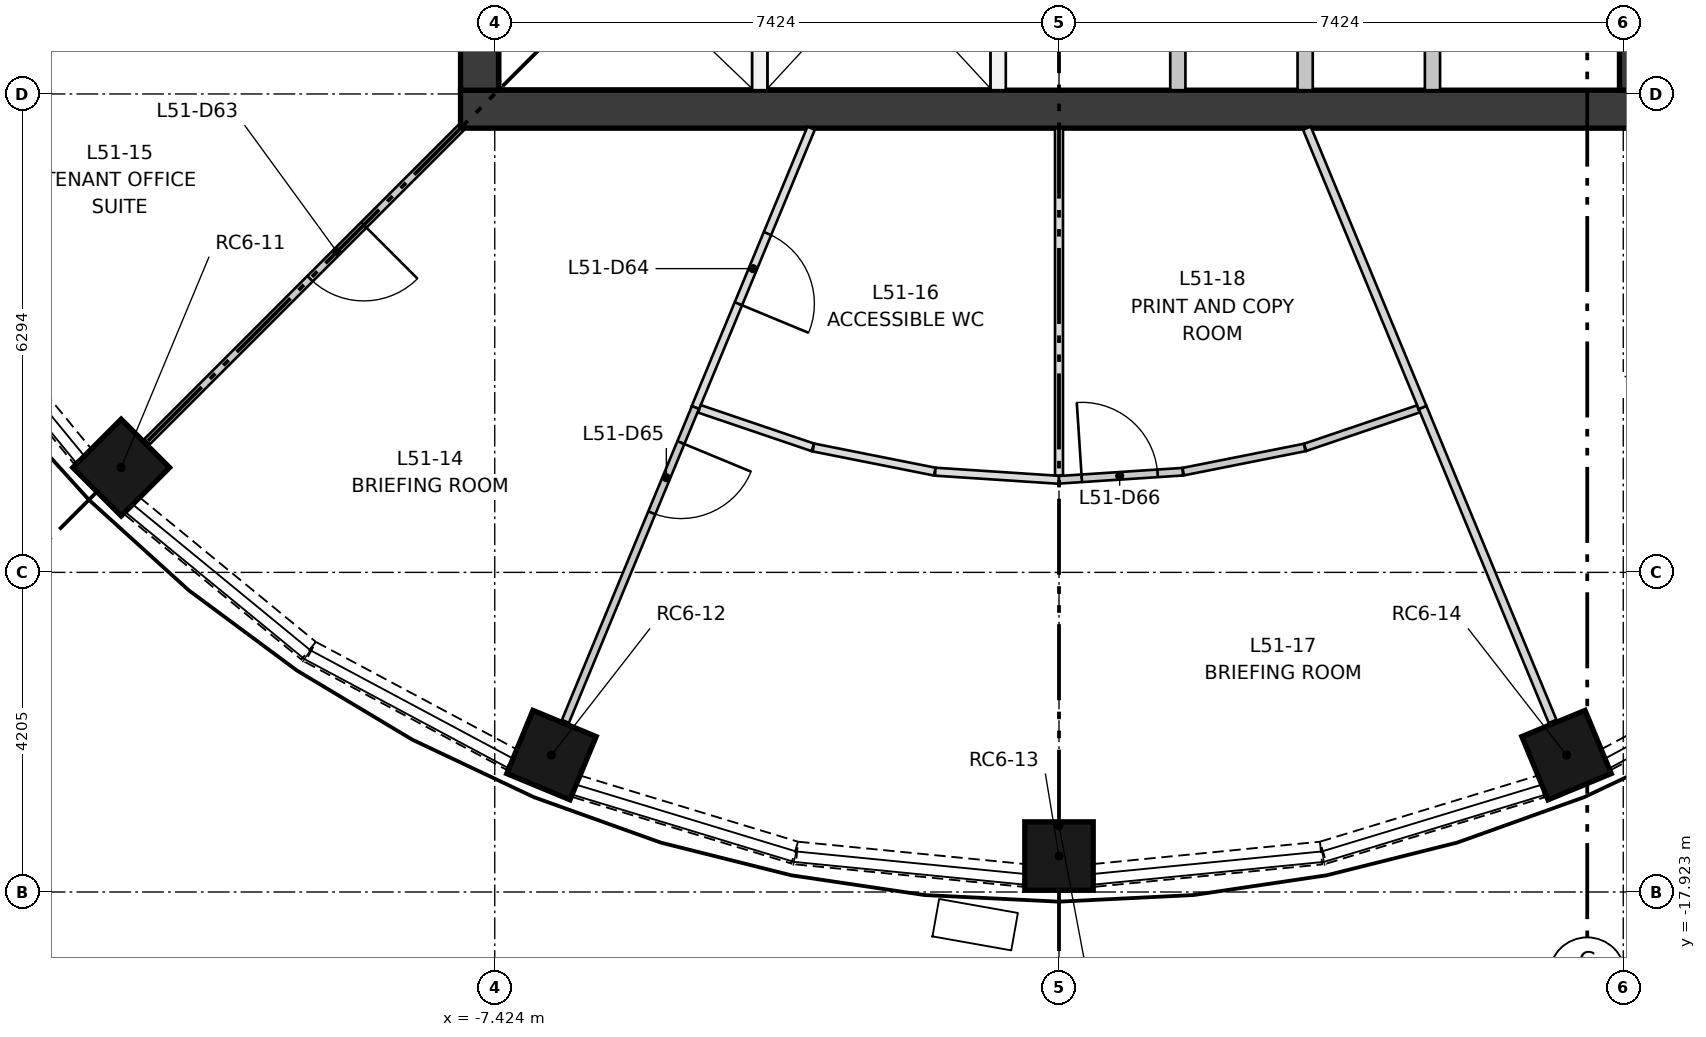
"""IFC4 building model, lengths in metres.
Left out: names, types, materials, properties, quantities, classifications, styles, units other than length and angle.
Written with IfcOpenShell. Run it as: python <this file> out.ifc"""

import sys

from ifc_helpers import new_model, si_unit, direction, frame, frame_2d, origin, origin_2d, place, context, subcontext, project, spatial, rectangle, extrude, element, fill, save


model = new_model("IFC4")
c1 = context("Model", 3, precision=1e-05, world=origin(), true_north=direction((0.0, 1.0)))
c2 = subcontext(c1, "Body", "Model", "MODEL_VIEW")
j1 = project(units=[si_unit("LENGTHUNIT", "METRE"), si_unit("PLANEANGLEUNIT", "RADIAN")], contexts=[c1])
p1 = place(None, origin())
s1 = spatial("IfcSite", under=j1, at=p1, CompositionType="ELEMENT")
p2 = place(p1, origin())
s2 = spatial("IfcBuilding", under=s1, at=p2, CompositionType="ELEMENT")
p3 = place(p2, frame((0.0, 0.0, 191.0)))
s3 = spatial("IfcBuildingStorey", under=s2, at=p3, CompositionType="ELEMENT", Elevation=191.0)
for number, where, z_axis, x_axis in (
    (1, (-12.339, -12.339, 0.0), (0.0, 0.0, 1.0), (-0.707, -0.707, 0.0)),
    (2, (-6.678, -16.122, 0.0), (0.0, 0.0, 1.0), (-0.383, -0.924, 0.0)),
    (3, (0.0, -17.45, 0.0), (0.0, 0.0, 1.0), (0.0, -1.0, 0.0)),
    (4, (6.678, -16.122, 0.0), (0.0, 0.0, 1.0), (0.383, -0.924, 0.0)),
):
    element("IfcColumn", number, at=place(p3, frame(where, z_axis=z_axis, x_axis=x_axis)), inside=s3, PredefinedType="COLUMN", context=c2, shape_type="SweptSolid", body=[
        extrude(rectangle(XDim=0.9, YDim=0.9, at=origin_2d()), origin(), (0.0, 0.0, 1.0), 2.85),
    ])
p4 = place(p3, frame((-7.874, -7.624, 0.0), z_axis=(0.0, 0.0, 1.0), x_axis=(1.0, 0.0, 0.0)))
e5 = element("IfcWall", 5, at=p4, inside=s3, PredefinedType="SHEAR", context=c2, shape_type="SweptSolid", body=[
    extrude(rectangle(XDim=15.748, YDim=0.5, at=frame_2d((7.874, 0.0))), origin(), (0.0, 0.0, 1.0), 3.35),
])
p5 = place(p3, frame((-7.624, -7.374, 0.0), z_axis=(0.0, 0.0, 1.0), x_axis=(0.0, 1.0, 0.0)))
e6 = element("IfcWall", 6, at=p5, inside=s3, PredefinedType="SHEAR", context=c2, shape_type="SweptSolid", body=[
    extrude(rectangle(XDim=14.748, YDim=0.5, at=frame_2d((7.374, 0.0))), origin(), (0.0, 0.0, 1.0), 3.35),
])
p6 = place(p5, frame((6.874, 0.0, 0.0)))
e7 = element("IfcOpeningElement", 7, at=p6, cuts=e6, PredefinedType="OPENING", context=c2, shape_type="SweptSolid", body=[
    extrude(rectangle(XDim=1.0, YDim=2.1, at=frame_2d((0.5, 1.05))), frame((0.0, 0.26, 0.0), z_axis=(0.0, -1.0, 0.0), x_axis=(1.0, 0.0, 0.0)), (0.0, 0.0, 1.0), 0.52),
])
p7 = place(p5, frame((3.75, 0.0, 0.0)))
e8 = element("IfcOpeningElement", 8, at=p7, cuts=e6, PredefinedType="OPENING", context=c2, shape_type="SweptSolid", body=[
    extrude(rectangle(XDim=1.8, YDim=2.1, at=frame_2d((0.9, 1.05))), frame((0.0, 0.26, 0.0), z_axis=(0.0, -1.0, 0.0), x_axis=(1.0, 0.0, 0.0)), (0.0, 0.0, 1.0), 0.52),
])
p8 = place(p5, frame((9.198, 0.0, 0.0)))
e9 = element("IfcOpeningElement", 9, at=p8, cuts=e6, PredefinedType="OPENING", context=c2, shape_type="SweptSolid", body=[
    extrude(rectangle(XDim=1.8, YDim=2.1, at=frame_2d((0.9, 1.05))), frame((0.0, 0.26, 0.0), z_axis=(0.0, -1.0, 0.0), x_axis=(1.0, 0.0, 0.0)), (0.0, 0.0, 1.0), 0.52),
])
p9 = place(p3, frame((7.624, -7.374, 0.0), z_axis=(0.0, 0.0, 1.0), x_axis=(0.0, 1.0, 0.0)))
e10 = element("IfcWall", 10, at=p9, inside=s3, PredefinedType="SHEAR", context=c2, shape_type="SweptSolid", body=[
    extrude(rectangle(XDim=14.748, YDim=0.5, at=frame_2d((7.374, 0.0))), origin(), (0.0, 0.0, 1.0), 3.35),
])
p10 = place(p9, frame((6.874, 0.0, 0.0)))
e11 = element("IfcOpeningElement", 11, at=p10, cuts=e10, PredefinedType="OPENING", context=c2, shape_type="SweptSolid", body=[
    extrude(rectangle(XDim=1.0, YDim=2.1, at=frame_2d((0.5, 1.05))), frame((0.0, 0.26, 0.0), z_axis=(0.0, -1.0, 0.0), x_axis=(1.0, 0.0, 0.0)), (0.0, 0.0, 1.0), 0.52),
])
p11 = place(p9, frame((3.75, 0.0, 0.0)))
e12 = element("IfcOpeningElement", 12, at=p11, cuts=e10, PredefinedType="OPENING", context=c2, shape_type="SweptSolid", body=[
    extrude(rectangle(XDim=1.8, YDim=2.1, at=frame_2d((0.9, 1.05))), frame((0.0, 0.26, 0.0), z_axis=(0.0, -1.0, 0.0), x_axis=(1.0, 0.0, 0.0)), (0.0, 0.0, 1.0), 0.52),
])
p12 = place(p9, frame((9.198, 0.0, 0.0)))
e13 = element("IfcOpeningElement", 13, at=p12, cuts=e10, PredefinedType="OPENING", context=c2, shape_type="SweptSolid", body=[
    extrude(rectangle(XDim=1.8, YDim=2.1, at=frame_2d((0.9, 1.05))), frame((0.0, 0.26, 0.0), z_axis=(0.0, -1.0, 0.0), x_axis=(1.0, 0.0, 0.0)), (0.0, 0.0, 1.0), 0.52),
])
for number, where, z_axis, x_axis in (
    (14, (-3.937, -7.374, 0.0), (0.0, 0.0, 1.0), (0.0, 1.0, 0.0)),
    (15, (-0.8, -7.374, 0.0), (0.0, 0.0, 1.0), (0.0, 1.0, 0.0)),
    (16, (1.563, -7.374, 0.0), (0.0, 0.0, 1.0), (0.0, 1.0, 0.0)),
    (17, (3.239, -7.374, 0.0), (0.0, 0.0, 1.0), (0.0, 1.0, 0.0)),
    (18, (4.914, -7.374, 0.0), (0.0, 0.0, 1.0), (0.0, 1.0, 0.0)),
):
    element("IfcWall", number, at=place(p3, frame(where, z_axis=z_axis, x_axis=x_axis)), inside=s3, PredefinedType="PARTITIONING", context=c2, shape_type="SweptSolid", body=[
        extrude(rectangle(XDim=3.2, YDim=0.2, at=frame_2d((1.6, 0.0))), origin(), (0.0, 0.0, 1.0), 3.0),
    ])
for number, where, z_axis, x_axis in (
    (19, (-14.749, -9.873, 0.0), (0.0, 0.0, 1.0), (0.634, -0.773, 0.0)),
    (20, (-12.191, -12.846, 0.0), (0.0, 0.0, 1.0), (0.773, -0.634, 0.0)),
):
    element("IfcWall", number, at=place(p3, frame(where, z_axis=z_axis, x_axis=x_axis)), inside=s3, PredefinedType="SOLIDWALL", context=c2, shape_type="SweptSolid", body=[
        extrude(rectangle(XDim=2.999, YDim=0.3, at=frame_2d((1.5, 0.0))), origin(), (0.0, 0.0, 1.0), 0.9),
    ])
p13 = place(p3, frame((-9.848, -14.765, 0.0), z_axis=(0.0, 0.0, 1.0), x_axis=(0.881827169278, -0.471572734074, 0.0)))
e21 = element("IfcWall", 21, at=p13, inside=s3, PredefinedType="SOLIDWALL", context=c2, shape_type="SweptSolid", body=[
    extrude(rectangle(XDim=2.998, YDim=0.3, at=frame_2d((1.499, 0.0))), origin(), (0.0, 0.0, 1.0), 0.9),
])
p14 = place(p3, frame((-6.347, -16.533, 0.0), z_axis=(0.0, 0.0, 1.0), x_axis=(0.95687774785, -0.290490921835, 0.0)))
e22 = element("IfcWall", 22, at=p14, inside=s3, PredefinedType="SOLIDWALL", context=c2, shape_type="SweptSolid", body=[
    extrude(rectangle(XDim=2.999, YDim=0.3, at=frame_2d((1.5, 0.0))), origin(), (0.0, 0.0, 1.0), 0.9),
])
for number, where, z_axis, x_axis in (
    (23, (-3.448, -17.41, 0.0), (0.0, 0.0, 1.0), (0.995, -0.098, 0.0)),
    (24, (0.464, -17.705, 0.0), (0.0, 0.0, 1.0), (0.995, 0.098, 0.0)),
):
    element("IfcWall", number, at=place(p3, frame(where, z_axis=z_axis, x_axis=x_axis)), inside=s3, PredefinedType="SOLIDWALL", context=c2, shape_type="SweptSolid", body=[
        extrude(rectangle(XDim=2.999, YDim=0.3, at=frame_2d((1.499, 0.0))), origin(), (0.0, 0.0, 1.0), 0.9),
    ])
p15 = place(p3, frame((3.477, -17.405, 0.0), z_axis=(0.0, 0.0, 1.0), x_axis=(0.95687774785, 0.290490921835, 0.0)))
e25 = element("IfcWall", 25, at=p15, inside=s3, PredefinedType="SOLIDWALL", context=c2, shape_type="SweptSolid", body=[
    extrude(rectangle(XDim=2.999, YDim=0.3, at=frame_2d((1.5, 0.0))), origin(), (0.0, 0.0, 1.0), 0.9),
])
p16 = place(p3, frame((7.204, -16.179, 0.0), z_axis=(0.0, 0.0, 1.0), x_axis=(0.881827169278, 0.471572734074, 0.0)))
e26 = element("IfcWall", 26, at=p16, inside=s3, PredefinedType="SOLIDWALL", context=c2, shape_type="SweptSolid", body=[
    extrude(rectangle(XDim=2.998, YDim=0.3, at=frame_2d((1.499, 0.0))), origin(), (0.0, 0.0, 1.0), 0.9),
])
p17 = place(p3, frame((-7.874, -7.874, 0.0), z_axis=(0.0, 0.0, 1.0), x_axis=(-0.707106781187, -0.707106781187, 0.0)))
e27 = element("IfcWall", 27, at=p17, inside=s3, PredefinedType="PARTITIONING", context=c2, shape_type="SweptSolid", body=[
    extrude(rectangle(XDim=5.834, YDim=0.1, at=frame_2d((2.917, 0.0))), origin(), (0.0, 0.0, 1.0), 3.0),
])
p18 = place(p17, frame((1.8, 0.0, 0.0)))
e28 = element("IfcOpeningElement", 28, at=p18, cuts=e27, PredefinedType="OPENING", context=c2, shape_type="SweptSolid", body=[
    extrude(rectangle(XDim=1.0, YDim=2.1, at=frame_2d((0.5, 1.05))), frame((0.0, 0.06, 0.0), z_axis=(0.0, -1.0, 0.0), x_axis=(1.0, 0.0, 0.0)), (0.0, 0.0, 1.0), 0.12),
])
p19 = place(p3, frame((-3.261, -7.874, 0.0), z_axis=(0.0, 0.0, 1.0), x_axis=(-0.382666229821, -0.923886657851, 0.0)))
e29 = element("IfcWall", 29, at=p19, inside=s3, PredefinedType="PARTITIONING", context=c2, shape_type="SweptSolid", body=[
    extrude(rectangle(XDim=3.977, YDim=0.105, at=frame_2d((1.989, 0.0))), origin(), (0.0, 0.0, 1.0), 3.0),
])
p20 = place(p19, frame((1.5, 0.0, 0.0)))
e30 = element("IfcOpeningElement", 30, at=p20, cuts=e29, PredefinedType="OPENING", context=c2, shape_type="SweptSolid", body=[
    extrude(rectangle(XDim=1.0, YDim=2.1, at=frame_2d((0.5, 1.05))), frame((0.0, 0.062, 0.0), z_axis=(0.0, -1.0, 0.0), x_axis=(1.0, 0.0, 0.0)), (0.0, 0.0, 1.0), 0.125),
])
p21 = place(p3, frame((-4.783, -11.549, 0.0), z_axis=(0.0, 0.0, 1.0), x_axis=(-0.382710359347, -0.92386837853, 0.0)))
e31 = element("IfcWall", 31, at=p21, inside=s3, PredefinedType="PARTITIONING", context=c2, shape_type="SweptSolid", body=[
    extrude(rectangle(XDim=4.47, YDim=0.1, at=frame_2d((2.235, 0.0))), origin(), (0.0, 0.0, 1.0), 3.0),
])
p22 = place(p21, frame((0.5, 0.0, 0.0)))
e32 = element("IfcOpeningElement", 32, at=p22, cuts=e31, PredefinedType="OPENING", context=c2, shape_type="SweptSolid", body=[
    extrude(rectangle(XDim=1.0, YDim=2.1, at=frame_2d((0.5, 1.05))), frame((0.0, 0.06, 0.0), z_axis=(0.0, -1.0, 0.0), x_axis=(1.0, 0.0, 0.0)), (0.0, 0.0, 1.0), 0.12),
])
p23 = place(p3, frame((-3.239, -12.073, 0.0), z_axis=(0.0, 0.0, 1.0), x_axis=(-0.946902062217, 0.321522136982, 0.0)))
e33 = element("IfcWall", 33, at=p23, inside=s3, PredefinedType="PARTITIONING", context=c2, shape_type="SweptSolid", body=[
    extrude(rectangle(XDim=1.576, YDim=0.105, at=frame_2d((0.788, 0.0))), origin(), (0.0, 0.0, 1.0), 3.0),
])
p24 = place(p3, frame((-1.635, -12.392, 0.0), z_axis=(0.0, 0.0, 1.0), x_axis=(-0.980782034379, 0.195106640172, 0.0)))
e34 = element("IfcWall", 34, at=p24, inside=s3, PredefinedType="PARTITIONING", context=c2, shape_type="SweptSolid", body=[
    extrude(rectangle(XDim=1.628, YDim=0.105, at=frame_2d((0.814, 0.0))), origin(), (0.0, 0.0, 1.0), 3.0),
])
p25 = place(p3, frame((0.0, -12.5, 0.0), z_axis=(0.0, 0.0, 1.0), x_axis=(-0.997859990953, 0.065386837014, 0.0)))
e35 = element("IfcWall", 35, at=p25, inside=s3, PredefinedType="PARTITIONING", context=c2, shape_type="SweptSolid", body=[
    extrude(rectangle(XDim=1.632, YDim=0.105, at=frame_2d((0.816, 0.0))), origin(), (0.0, 0.0, 1.0), 3.0),
])
p26 = place(p3, frame((0.0, -7.874, 0.0), z_axis=(0.0, 0.0, 1.0), x_axis=(0.0, -1.0, 0.0)))
e36 = element("IfcWall", 36, at=p26, inside=s3, PredefinedType="PARTITIONING", context=c2, shape_type="SweptSolid", body=[
    extrude(rectangle(XDim=4.57, YDim=0.105, at=frame_2d((2.285, 0.0))), origin(), (0.0, 0.0, 1.0), 3.0),
])
p27 = place(p3, frame((0.0, -12.5, 0.0), z_axis=(0.0, 0.0, 1.0), x_axis=(0.997860630529, 0.065377075793, 0.0)))
e37 = element("IfcWall", 37, at=p27, inside=s3, PredefinedType="PARTITIONING", context=c2, shape_type="SweptSolid", body=[
    extrude(rectangle(XDim=1.632, YDim=0.1, at=frame_2d((0.816, 0.0))), origin(), (0.0, 0.0, 1.0), 3.0),
])
p28 = place(p27, frame((0.3, 0.0, 0.0)))
e38 = element("IfcOpeningElement", 38, at=p28, cuts=e37, PredefinedType="OPENING", context=c2, shape_type="SweptSolid", body=[
    extrude(rectangle(XDim=1.0, YDim=2.1, at=frame_2d((0.5, 1.05))), frame((0.0, 0.06, 0.0), z_axis=(0.0, -1.0, 0.0), x_axis=(1.0, 0.0, 0.0)), (0.0, 0.0, 1.0), 0.12),
])
p29 = place(p3, frame((1.635, -12.393, 0.0), z_axis=(0.0, 0.0, 1.0), x_axis=(0.980764756379, 0.195193474902, 0.0)))
e39 = element("IfcWall", 39, at=p29, inside=s3, PredefinedType="PARTITIONING", context=c2, shape_type="SweptSolid", body=[
    extrude(rectangle(XDim=1.628, YDim=0.1, at=frame_2d((0.814, 0.0))), origin(), (0.0, 0.0, 1.0), 3.0),
])
p30 = place(p3, frame((3.238, -12.073, 0.0), z_axis=(0.0, 0.0, 1.0), x_axis=(0.946962681405, 0.321343554512, 0.0)))
e40 = element("IfcWall", 40, at=p30, inside=s3, PredefinedType="PARTITIONING", context=c2, shape_type="SweptSolid", body=[
    extrude(rectangle(XDim=1.573, YDim=0.1, at=frame_2d((0.787, 0.0))), origin(), (0.0, 0.0, 1.0), 3.0),
])
p31 = place(p3, frame((4.783, -11.549, 0.0), z_axis=(0.0, 0.0, 1.0), x_axis=(0.382710359347, -0.92386837853, 0.0)))
e41 = element("IfcWall", 41, at=p31, inside=s3, PredefinedType="PARTITIONING", context=c2, shape_type="SweptSolid", body=[
    extrude(rectangle(XDim=4.47, YDim=0.11, at=frame_2d((2.235, 0.0))), origin(), (0.0, 0.0, 1.0), 3.0),
])
p32 = place(p3, frame((3.261, -7.874, 0.0), z_axis=(0.0, 0.0, 1.0), x_axis=(0.382666229821, -0.923886657851, 0.0)))
e42 = element("IfcWall", 42, at=p32, inside=s3, PredefinedType="PARTITIONING", context=c2, shape_type="SweptSolid", body=[
    extrude(rectangle(XDim=3.977, YDim=0.11, at=frame_2d((1.989, 0.0))), origin(), (0.0, 0.0, 1.0), 3.0),
])
p33 = place(p18, origin())
e43 = element("IfcDoor", 43, at=p33, inside=s3, OperationType="SINGLE_SWING_LEFT", PredefinedType="DOOR", context=c2, shape_type="SweptSolid", body=[
    extrude(rectangle(XDim=1.0, YDim=2.1, at=frame_2d((0.5, 1.05))), frame((0.0, 0.025, 0.0), z_axis=(0.0, -1.0, 0.0), x_axis=(1.0, 0.0, 0.0)), (0.0, 0.0, 1.0), 0.05),
])
fill(e28, e43)
p34 = place(p20, origin())
e44 = element("IfcDoor", 44, at=p34, inside=s3, OperationType="SINGLE_SWING_RIGHT", PredefinedType="DOOR", context=c2, shape_type="SweptSolid", body=[
    extrude(rectangle(XDim=1.0, YDim=2.1, at=frame_2d((0.5, 1.05))), frame((0.0, 0.025, 0.0), z_axis=(0.0, -1.0, 0.0), x_axis=(1.0, 0.0, 0.0)), (0.0, 0.0, 1.0), 0.05),
])
fill(e30, e44)
p35 = place(p22, origin())
e45 = element("IfcDoor", 45, at=p35, inside=s3, OperationType="SINGLE_SWING_LEFT", PredefinedType="DOOR", context=c2, shape_type="SweptSolid", body=[
    extrude(rectangle(XDim=1.0, YDim=2.1, at=frame_2d((0.5, 1.05))), frame((0.0, 0.025, 0.0), z_axis=(0.0, -1.0, 0.0), x_axis=(1.0, 0.0, 0.0)), (0.0, 0.0, 1.0), 0.05),
])
fill(e32, e45)
p36 = place(p28, origin())
e46 = element("IfcDoor", 46, at=p36, inside=s3, OperationType="SINGLE_SWING_LEFT", PredefinedType="DOOR", context=c2, shape_type="SweptSolid", body=[
    extrude(rectangle(XDim=1.0, YDim=2.1, at=frame_2d((0.5, 1.05))), frame((0.0, 0.025, 0.0), z_axis=(0.0, -1.0, 0.0), x_axis=(1.0, 0.0, 0.0)), (0.0, 0.0, 1.0), 0.05),
])
fill(e38, e46)
save(model, sys.argv[1])
